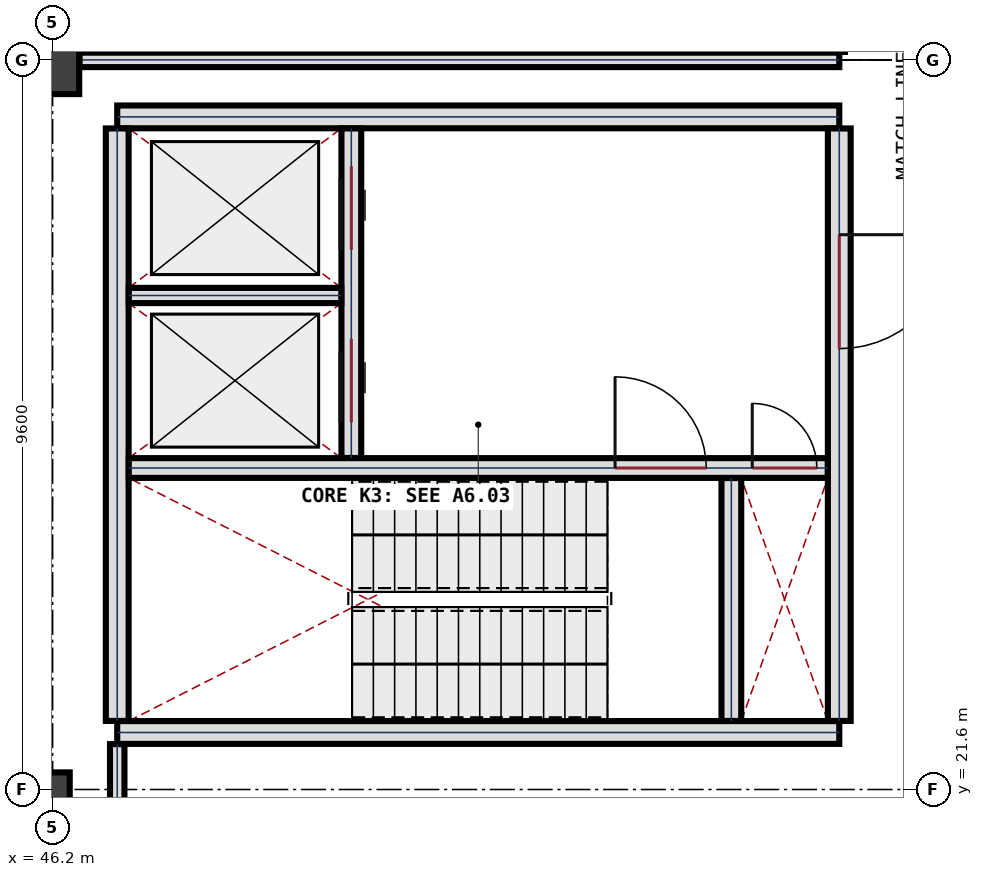
"""IFC4 building model, lengths in metres.
Left out: names, types, materials, properties, quantities, classifications, styles, units other than length and angle.
Written with IfcOpenShell. Run it as: python <this file> out.ifc"""

import sys

from ifc_helpers import new_model, si_unit, direction, frame, frame_2d, origin, origin_2d, place, context, subcontext, project, spatial, rectangle, extrude, element, fill, save


model = new_model("IFC4")
c1 = context("Model", 3, precision=1e-05, world=origin(), true_north=direction((0.0, 1.0)))
c2 = subcontext(c1, "Body", "Model", "MODEL_VIEW")
j1 = project(units=[si_unit("LENGTHUNIT", "METRE"), si_unit("PLANEANGLEUNIT", "RADIAN")], contexts=[c1])
p1 = place(None, origin())
s1 = spatial("IfcSite", under=j1, at=p1, CompositionType="ELEMENT")
p2 = place(p1, origin())
s2 = spatial("IfcBuilding", under=s1, at=p2, CompositionType="ELEMENT")
p3 = place(p2, frame((0.0, 0.0, 5.4)))
s3 = spatial("IfcBuildingStorey", under=s2, at=p3, CompositionType="ELEMENT", Elevation=5.4)
p4 = place(p3, frame((46.2, 21.6, 0.0), z_axis=(0.0, 0.0, 1.0), x_axis=(1.0, 0.0, 0.0)))
e1 = element("IfcColumn", 1, at=p4, inside=s3, PredefinedType="COLUMN", context=c2, shape_type="SweptSolid", body=[
    extrude(rectangle(XDim=0.45, YDim=0.45, at=origin_2d()), origin(), (0.0, 0.0, 1.0), 4.5),
])
p5 = place(p3, frame((46.2, 31.2, 0.0), z_axis=(0.0, 0.0, 1.0), x_axis=(0.0, 1.0, 0.0)))
e2 = element("IfcColumn", 2, at=p5, inside=s3, PredefinedType="COLUMN", context=c2, shape_type="SweptSolid", body=[
    extrude(rectangle(XDim=0.9, YDim=0.7, at=origin_2d()), origin(), (0.0, 0.0, 1.0), 4.5),
])
for number, where, z_axis, x_axis in (
    (3, (56.55, 22.35, 0.0), (0.0, 0.0, 1.0), (-1.0, 0.0, 0.0)),
    (4, (47.05, 30.45, 0.0), (0.0, 0.0, 1.0), (1.0, 0.0, 0.0)),
):
    element("IfcWall", number, at=place(p3, frame(where, z_axis=z_axis, x_axis=x_axis)), inside=s3, PredefinedType="SHEAR", context=c2, shape_type="SweptSolid", body=[
        extrude(rectangle(XDim=9.5, YDim=0.3, at=frame_2d((4.75, 0.0))), origin(), (0.0, 0.0, 1.0), 4.5),
    ])
p6 = place(p3, frame((47.05, 22.502, 0.0), z_axis=(0.0, 0.0, 1.0), x_axis=(0.0, 1.0, 0.0)))
e5 = element("IfcWall", 5, at=p6, inside=s3, PredefinedType="SHEAR", context=c2, shape_type="SweptSolid", body=[
    extrude(rectangle(XDim=7.796, YDim=0.3, at=frame_2d((3.898, 0.0))), origin(), (0.0, 0.0, 1.0), 4.5),
])
p7 = place(p3, frame((56.55, 30.298, 0.0), z_axis=(0.0, 0.0, 1.0), x_axis=(0.0, -1.0, 0.0)))
e6 = element("IfcWall", 6, at=p7, inside=s3, PredefinedType="SHEAR", context=c2, shape_type="SweptSolid", body=[
    extrude(rectangle(XDim=7.796, YDim=0.3, at=frame_2d((3.898, 0.0))), origin(), (0.0, 0.0, 1.0), 4.5),
])
p8 = place(p7, frame((1.398, 0.0, 0.0)))
e7 = element("IfcOpeningElement", 7, at=p8, cuts=e6, PredefinedType="OPENING", context=c2, shape_type="SweptSolid", body=[
    extrude(rectangle(XDim=1.5, YDim=2.25, at=frame_2d((0.75, 1.125))), frame((0.0, 0.16, 0.0), z_axis=(0.0, -1.0, 0.0), x_axis=(1.0, 0.0, 0.0)), (0.0, 0.0, 1.0), 0.32),
])
p9 = place(p3, frame((47.202, 25.83, 0.0), z_axis=(0.0, 0.0, 1.0), x_axis=(1.0, 0.0, 0.0)))
e8 = element("IfcWall", 8, at=p9, inside=s3, PredefinedType="SHEAR", context=c2, shape_type="SweptSolid", body=[
    extrude(rectangle(XDim=9.196, YDim=0.26, at=frame_2d((4.598, 0.0))), origin(), (0.0, 0.0, 1.0), 4.5),
])
p10 = place(p9, frame((6.398, 0.0, 0.0)))
e9 = element("IfcOpeningElement", 9, at=p10, cuts=e8, PredefinedType="OPENING", context=c2, shape_type="SweptSolid", body=[
    extrude(rectangle(XDim=1.2, YDim=2.2, at=frame_2d((0.6, 1.1))), frame((0.0, 0.14, 0.0), z_axis=(0.0, -1.0, 0.0), x_axis=(1.0, 0.0, 0.0)), (0.0, 0.0, 1.0), 0.28),
])
p11 = place(p9, frame((8.203, 0.0, 0.0)))
e10 = element("IfcOpeningElement", 10, at=p11, cuts=e8, PredefinedType="OPENING", context=c2, shape_type="SweptSolid", body=[
    extrude(rectangle(XDim=0.85, YDim=2.05, at=frame_2d((0.425, 1.025))), frame((0.0, 0.14, 0.0), z_axis=(0.0, -1.0, 0.0), x_axis=(1.0, 0.0, 0.0)), (0.0, 0.0, 1.0), 0.28),
])
p12 = place(p3, frame((55.13, 22.502, 0.0), z_axis=(0.0, 0.0, 1.0), x_axis=(0.0, 1.0, 0.0)))
e11 = element("IfcWall", 11, at=p12, inside=s3, PredefinedType="SHEAR", context=c2, shape_type="SweptSolid", body=[
    extrude(rectangle(XDim=3.196, YDim=0.26, at=frame_2d((1.598, 0.0))), origin(), (0.0, 0.0, 1.0), 4.5),
])
p13 = place(p3, frame((50.13, 25.962, 0.0), z_axis=(0.0, 0.0, 1.0), x_axis=(0.0, 1.0, 0.0)))
e12 = element("IfcWall", 12, at=p13, inside=s3, PredefinedType="SHEAR", context=c2, shape_type="SweptSolid", body=[
    extrude(rectangle(XDim=4.336, YDim=0.26, at=frame_2d((2.168, 0.0))), origin(), (0.0, 0.0, 1.0), 4.5),
])
p14 = place(p13, frame((0.468, 0.0, 0.0)))
e13 = element("IfcOpeningElement", 13, at=p14, cuts=e12, PredefinedType="OPENING", context=c2, shape_type="SweptSolid", body=[
    extrude(rectangle(XDim=1.1, YDim=2.15, at=frame_2d((0.55, 1.075))), frame((0.0, 0.14, 0.0), z_axis=(0.0, -1.0, 0.0), x_axis=(1.0, 0.0, 0.0)), (0.0, 0.0, 1.0), 0.28),
])
p15 = place(p13, frame((2.738, 0.0, 0.0)))
e14 = element("IfcOpeningElement", 14, at=p15, cuts=e12, PredefinedType="OPENING", context=c2, shape_type="SweptSolid", body=[
    extrude(rectangle(XDim=1.1, YDim=2.15, at=frame_2d((0.55, 1.075))), frame((0.0, 0.14, 0.0), z_axis=(0.0, -1.0, 0.0), x_axis=(1.0, 0.0, 0.0)), (0.0, 0.0, 1.0), 0.28),
])
p16 = place(p3, frame((47.202, 28.1, 0.0), z_axis=(0.0, 0.0, 1.0), x_axis=(1.0, 0.0, 0.0)))
e15 = element("IfcWall", 15, at=p16, inside=s3, PredefinedType="PLUMBINGWALL", context=c2, shape_type="SweptSolid", body=[
    extrude(rectangle(XDim=2.796, YDim=0.2, at=frame_2d((1.398, 0.0))), origin(), (0.0, 0.0, 1.0), 4.18),
])
p17 = place(p3, frame((46.553, 31.2, 0.0), z_axis=(0.0, 0.0, 1.0), x_axis=(1.0, 0.0, 0.0)))
e16 = element("IfcWall", 16, at=p17, inside=s3, PredefinedType="PARTITIONING", context=c2, shape_type="SweptSolid", body=[
    extrude(rectangle(XDim=9.997, YDim=0.19, at=frame_2d((4.999, 0.0))), origin(), (0.0, 0.0, 1.0), 3.42),
])
p18 = place(p3, frame((47.05, 20.905, 0.0), z_axis=(0.0, 0.0, 1.0), x_axis=(0.0, 1.0, 0.0)))
e17 = element("IfcWall", 17, at=p18, inside=s3, PredefinedType="PARTITIONING", context=c2, shape_type="SweptSolid", body=[
    extrude(rectangle(XDim=1.292, YDim=0.19, at=frame_2d((0.646, 0.0))), origin(), (0.0, 0.0, 1.0), 3.37),
])
p19 = place(p8, origin())
e18 = element("IfcDoor", 18, at=p19, inside=s3, OperationType="SINGLE_SWING_LEFT", PredefinedType="DOOR", context=c2, shape_type="SweptSolid", body=[
    extrude(rectangle(XDim=1.5, YDim=2.25, at=frame_2d((0.75, 1.125))), frame((0.0, 0.032, 0.0), z_axis=(0.0, -1.0, 0.0), x_axis=(1.0, 0.0, 0.0)), (0.0, 0.0, 1.0), 0.065),
])
fill(e7, e18)
p20 = place(p10, origin())
e19 = element("IfcDoor", 19, at=p20, inside=s3, OperationType="SINGLE_SWING_LEFT", PredefinedType="DOOR", context=c2, shape_type="SweptSolid", body=[
    extrude(rectangle(XDim=1.2, YDim=2.2, at=frame_2d((0.6, 1.1))), frame((0.0, 0.032, 0.0), z_axis=(0.0, -1.0, 0.0), x_axis=(1.0, 0.0, 0.0)), (0.0, 0.0, 1.0), 0.065),
])
fill(e9, e19)
p21 = place(p11, origin())
e20 = element("IfcDoor", 20, at=p21, inside=s3, OperationType="SINGLE_SWING_LEFT", PredefinedType="DOOR", context=c2, shape_type="SweptSolid", body=[
    extrude(rectangle(XDim=0.85, YDim=2.05, at=frame_2d((0.425, 1.025))), frame((0.0, 0.032, 0.0), z_axis=(0.0, -1.0, 0.0), x_axis=(1.0, 0.0, 0.0)), (0.0, 0.0, 1.0), 0.065),
])
fill(e10, e20)
p22 = place(p14, origin())
e21 = element("IfcDoor", 21, at=p22, inside=s3, OperationType="SLIDING_TO_LEFT", PredefinedType="DOOR", context=c2, shape_type="SweptSolid", body=[
    extrude(rectangle(XDim=1.1, YDim=2.15, at=frame_2d((0.55, 1.075))), frame((0.0, 0.032, 0.0), z_axis=(0.0, -1.0, 0.0), x_axis=(1.0, 0.0, 0.0)), (0.0, 0.0, 1.0), 0.065),
])
fill(e13, e21)
p23 = place(p15, origin())
e22 = element("IfcDoor", 22, at=p23, inside=s3, OperationType="SLIDING_TO_LEFT", PredefinedType="DOOR", context=c2, shape_type="SweptSolid", body=[
    extrude(rectangle(XDim=1.1, YDim=2.15, at=frame_2d((0.55, 1.075))), frame((0.0, 0.032, 0.0), z_axis=(0.0, -1.0, 0.0), x_axis=(1.0, 0.0, 0.0)), (0.0, 0.0, 1.0), 0.065),
])
fill(e14, e22)
save(model, sys.argv[1])
